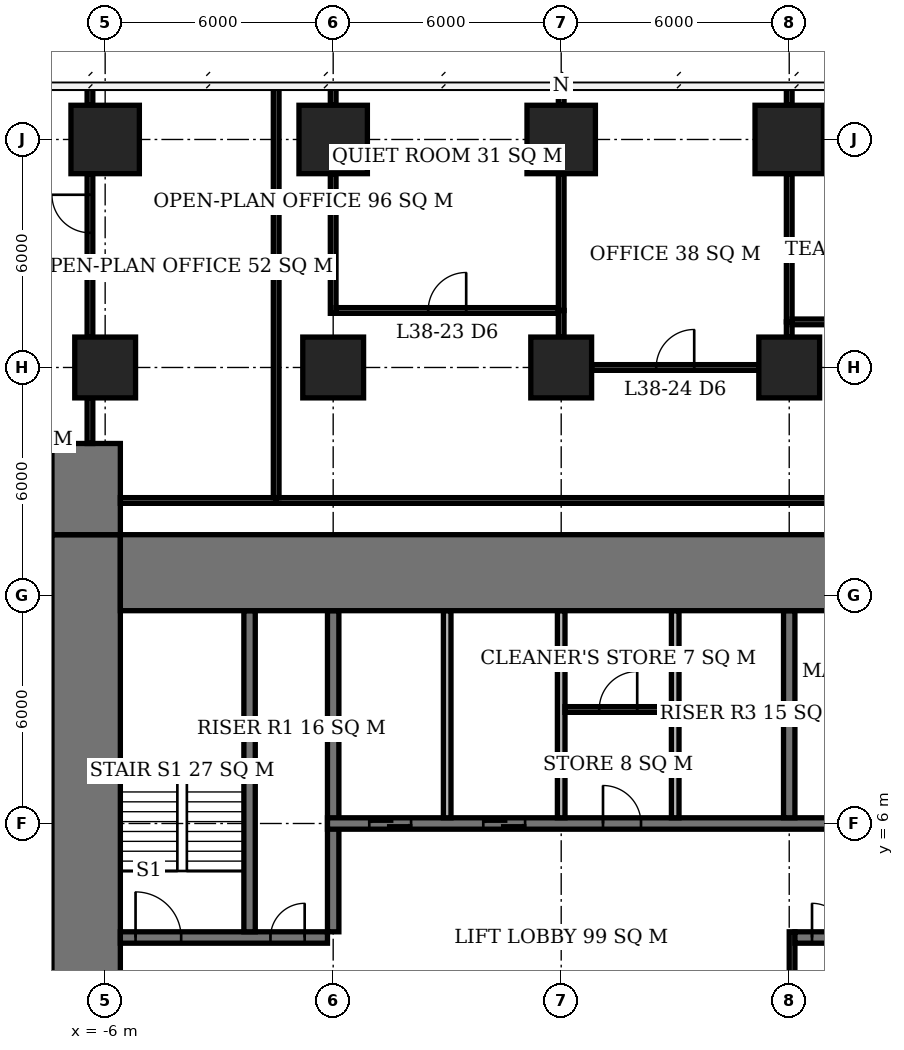
"""IFC4 building model, lengths in metres.
Left out: names, types, materials, properties, quantities, classifications, styles, units other than length and angle.
Written with IfcOpenShell. Run it as: python <this file> out.ifc"""

import sys

from ifc_helpers import new_model, si_unit, direction, frame, frame_2d, origin, origin_2d, place, context, subcontext, project, spatial, rectangle, extrude, element, fill, save


model = new_model("IFC4")
c1 = context("Model", 3, precision=1e-05, world=origin(), true_north=direction((0.0, 1.0)))
c2 = subcontext(c1, "Body", "Model", "MODEL_VIEW")
j1 = project(units=[si_unit("LENGTHUNIT", "METRE"), si_unit("PLANEANGLEUNIT", "RADIAN")], contexts=[c1])
p1 = place(None, origin())
s1 = spatial("IfcSite", under=j1, at=p1, CompositionType="ELEMENT")
p2 = place(p1, origin())
s2 = spatial("IfcBuilding", under=s1, at=p2, CompositionType="ELEMENT")
p3 = place(p2, frame((0.0, 0.0, 156.2)))
s3 = spatial("IfcBuildingStorey", under=s2, at=p3, CompositionType="ELEMENT", Elevation=156.2)
p4 = place(p3, frame((-6.0, 18.0, 0.0), z_axis=(0.0, 0.0, 1.0), x_axis=(1.0, 0.0, 0.0)))
e1 = element("IfcColumn", 1, at=p4, inside=s3, PredefinedType="COLUMN", context=c2, shape_type="SweptSolid", body=[
    extrude(rectangle(XDim=1.6, YDim=1.6, at=origin_2d()), origin(), (0.0, 0.0, 1.0), 3.9),
])
p5 = place(p3, frame((-6.0, 24.0, 0.0), z_axis=(0.0, 0.0, 1.0), x_axis=(1.0, 0.0, 0.0)))
e2 = element("IfcColumn", 2, at=p5, inside=s3, PredefinedType="COLUMN", context=c2, shape_type="SweptSolid", body=[
    extrude(rectangle(XDim=1.8, YDim=1.8, at=origin_2d()), origin(), (0.0, 0.0, 1.0), 3.9),
])
p6 = place(p3, frame((0.0, 18.0, 0.0), z_axis=(0.0, 0.0, 1.0), x_axis=(1.0, 0.0, 0.0)))
e3 = element("IfcColumn", 3, at=p6, inside=s3, PredefinedType="COLUMN", context=c2, shape_type="SweptSolid", body=[
    extrude(rectangle(XDim=1.6, YDim=1.6, at=origin_2d()), origin(), (0.0, 0.0, 1.0), 3.9),
])
p7 = place(p3, frame((0.0, 24.0, 0.0), z_axis=(0.0, 0.0, 1.0), x_axis=(1.0, 0.0, 0.0)))
e4 = element("IfcColumn", 4, at=p7, inside=s3, PredefinedType="COLUMN", context=c2, shape_type="SweptSolid", body=[
    extrude(rectangle(XDim=1.8, YDim=1.8, at=origin_2d()), origin(), (0.0, 0.0, 1.0), 3.9),
])
p8 = place(p3, frame((6.0, 18.0, 0.0), z_axis=(0.0, 0.0, 1.0), x_axis=(1.0, 0.0, 0.0)))
e5 = element("IfcColumn", 5, at=p8, inside=s3, PredefinedType="COLUMN", context=c2, shape_type="SweptSolid", body=[
    extrude(rectangle(XDim=1.6, YDim=1.6, at=origin_2d()), origin(), (0.0, 0.0, 1.0), 3.9),
])
p9 = place(p3, frame((6.0, 24.0, 0.0), z_axis=(0.0, 0.0, 1.0), x_axis=(1.0, 0.0, 0.0)))
e6 = element("IfcColumn", 6, at=p9, inside=s3, PredefinedType="COLUMN", context=c2, shape_type="SweptSolid", body=[
    extrude(rectangle(XDim=1.8, YDim=1.8, at=origin_2d()), origin(), (0.0, 0.0, 1.0), 3.9),
])
p10 = place(p3, frame((12.0, 18.0, 0.0), z_axis=(0.0, 0.0, 1.0), x_axis=(1.0, 0.0, 0.0)))
e7 = element("IfcColumn", 7, at=p10, inside=s3, PredefinedType="COLUMN", context=c2, shape_type="SweptSolid", body=[
    extrude(rectangle(XDim=1.6, YDim=1.6, at=origin_2d()), origin(), (0.0, 0.0, 1.0), 3.9),
])
p11 = place(p3, frame((12.0, 24.0, 0.0), z_axis=(0.0, 0.0, 1.0), x_axis=(1.0, 0.0, 0.0)))
e8 = element("IfcColumn", 8, at=p11, inside=s3, PredefinedType="COLUMN", context=c2, shape_type="SweptSolid", body=[
    extrude(rectangle(XDim=1.8, YDim=1.8, at=origin_2d()), origin(), (0.0, 0.0, 1.0), 3.9),
])
p12 = place(p3, frame((-5.6, 12.6, 0.0), z_axis=(0.0, 0.0, 1.0), x_axis=(1.0, 0.0, 0.0)))
e9 = element("IfcWall", 9, at=p12, inside=s3, PredefinedType="SHEAR", context=c2, shape_type="SweptSolid", body=[
    extrude(rectangle(XDim=23.2, YDim=2.0, at=frame_2d((11.6, 0.0))), origin(), (0.0, 0.0, 1.0), 3.9),
])
p13 = place(p3, frame((-6.5, -7.6, 0.0), z_axis=(0.0, 0.0, 1.0), x_axis=(0.0, 1.0, 0.0)))
e10 = element("IfcWall", 10, at=p13, inside=s3, PredefinedType="SHEAR", context=c2, shape_type="SweptSolid", body=[
    extrude(rectangle(XDim=21.2, YDim=1.8, at=frame_2d((10.6, 0.0))), origin(), (0.0, 0.0, 1.0), 3.9),
])
p14 = place(p13, frame((7.8, 0.0, 0.0)))
e11 = element("IfcOpeningElement", 11, at=p14, cuts=e10, PredefinedType="OPENING", context=c2, shape_type="SweptSolid", body=[
    extrude(rectangle(XDim=1.8, YDim=2.4, at=frame_2d((0.9, 1.2))), frame((0.0, 0.91, 0.0), z_axis=(0.0, -1.0, 0.0), x_axis=(1.0, 0.0, 0.0)), (0.0, 0.0, 1.0), 1.82),
])
p15 = place(p3, frame((-6.5, 13.6, 0.0), z_axis=(0.0, 0.0, 1.0), x_axis=(0.0, 1.0, 0.0)))
e12 = element("IfcWall", 12, at=p15, inside=s3, PredefinedType="SHEAR", context=c2, shape_type="SweptSolid", body=[
    extrude(rectangle(XDim=2.4, YDim=1.8, at=frame_2d((1.2, 0.0))), origin(), (0.0, 0.0, 1.0), 3.9),
])
p16 = place(p3, frame((-5.6, 3.0, 0.0), z_axis=(0.0, 0.0, 1.0), x_axis=(1.0, 0.0, 0.0)))
e13 = element("IfcWall", 13, at=p16, inside=s3, PredefinedType="SHEAR", context=c2, shape_type="SweptSolid", body=[
    extrude(rectangle(XDim=5.45, YDim=0.3, at=frame_2d((2.725, 0.0))), origin(), (0.0, 0.0, 1.0), 3.9),
])
p17 = place(p16, frame((0.4, 0.0, 0.0)))
e14 = element("IfcOpeningElement", 14, at=p17, cuts=e13, PredefinedType="OPENING", context=c2, shape_type="SweptSolid", body=[
    extrude(rectangle(XDim=1.2, YDim=2.1, at=frame_2d((0.6, 1.05))), frame((0.0, 0.16, 0.0), z_axis=(0.0, -1.0, 0.0), x_axis=(1.0, 0.0, 0.0)), (0.0, 0.0, 1.0), 0.32),
])
p18 = place(p16, frame((3.95, 0.0, 0.0)))
e15 = element("IfcOpeningElement", 15, at=p18, cuts=e13, PredefinedType="OPENING", context=c2, shape_type="SweptSolid", body=[
    extrude(rectangle(XDim=0.9, YDim=2.1, at=frame_2d((0.45, 1.05))), frame((0.0, 0.16, 0.0), z_axis=(0.0, -1.0, 0.0), x_axis=(1.0, 0.0, 0.0)), (0.0, 0.0, 1.0), 0.32),
])
p19 = place(p3, frame((12.15, 3.0, 0.0), z_axis=(0.0, 0.0, 1.0), x_axis=(1.0, 0.0, 0.0)))
e16 = element("IfcWall", 16, at=p19, inside=s3, PredefinedType="SHEAR", context=c2, shape_type="SweptSolid", body=[
    extrude(rectangle(XDim=5.45, YDim=0.3, at=frame_2d((2.725, 0.0))), origin(), (0.0, 0.0, 1.0), 3.9),
])
p20 = place(p19, frame((3.25, 0.0, 0.0)))
e17 = element("IfcOpeningElement", 17, at=p20, cuts=e16, PredefinedType="OPENING", context=c2, shape_type="SweptSolid", body=[
    extrude(rectangle(XDim=1.2, YDim=2.1, at=frame_2d((0.6, 1.05))), frame((0.0, 0.16, 0.0), z_axis=(0.0, -1.0, 0.0), x_axis=(1.0, 0.0, 0.0)), (0.0, 0.0, 1.0), 0.32),
])
p21 = place(p19, frame((0.45, 0.0, 0.0)))
e18 = element("IfcOpeningElement", 18, at=p21, cuts=e16, PredefinedType="OPENING", context=c2, shape_type="SweptSolid", body=[
    extrude(rectangle(XDim=0.9, YDim=2.1, at=frame_2d((0.45, 1.05))), frame((0.0, 0.16, 0.0), z_axis=(0.0, -1.0, 0.0), x_axis=(1.0, 0.0, 0.0)), (0.0, 0.0, 1.0), 0.32),
])
p22 = place(p3, frame((-0.15, 6.0, 0.0), z_axis=(0.0, 0.0, 1.0), x_axis=(1.0, 0.0, 0.0)))
e19 = element("IfcWall", 19, at=p22, inside=s3, PredefinedType="SHEAR", context=c2, shape_type="SweptSolid", body=[
    extrude(rectangle(XDim=17.75, YDim=0.3, at=frame_2d((8.875, 0.0))), origin(), (0.0, 0.0, 1.0), 3.9),
])
p23 = place(p22, frame((13.15, 0.0, 0.0)))
e20 = element("IfcOpeningElement", 20, at=p23, cuts=e19, PredefinedType="OPENING", context=c2, shape_type="SweptSolid", body=[
    extrude(rectangle(XDim=0.9, YDim=2.1, at=frame_2d((0.45, 1.05))), frame((0.0, 0.16, 0.0), z_axis=(0.0, -1.0, 0.0), x_axis=(1.0, 0.0, 0.0)), (0.0, 0.0, 1.0), 0.32),
])
p24 = place(p22, frame((7.25, 0.0, 0.0)))
e21 = element("IfcOpeningElement", 21, at=p24, cuts=e19, PredefinedType="OPENING", context=c2, shape_type="SweptSolid", body=[
    extrude(rectangle(XDim=1.0, YDim=2.1, at=frame_2d((0.5, 1.05))), frame((0.0, 0.16, 0.0), z_axis=(0.0, -1.0, 0.0), x_axis=(1.0, 0.0, 0.0)), (0.0, 0.0, 1.0), 0.32),
])
p25 = place(p22, frame((1.1, 0.0, 0.0)))
e22 = element("IfcOpeningElement", 22, at=p25, cuts=e19, PredefinedType="OPENING", context=c2, shape_type="SweptSolid", body=[
    extrude(rectangle(XDim=1.1, YDim=2.1, at=frame_2d((0.55, 1.05))), frame((0.0, 0.16, 0.0), z_axis=(0.0, -1.0, 0.0), x_axis=(1.0, 0.0, 0.0)), (0.0, 0.0, 1.0), 0.32),
])
p26 = place(p22, frame((4.1, 0.0, 0.0)))
e23 = element("IfcOpeningElement", 23, at=p26, cuts=e19, PredefinedType="OPENING", context=c2, shape_type="SweptSolid", body=[
    extrude(rectangle(XDim=1.1, YDim=2.1, at=frame_2d((0.55, 1.05))), frame((0.0, 0.16, 0.0), z_axis=(0.0, -1.0, 0.0), x_axis=(1.0, 0.0, 0.0)), (0.0, 0.0, 1.0), 0.32),
])
p27 = place(p3, frame((0.0, 3.15, 0.0), z_axis=(0.0, 0.0, 1.0), x_axis=(0.0, 1.0, 0.0)))
e24 = element("IfcWall", 24, at=p27, inside=s3, PredefinedType="SHEAR", context=c2, shape_type="SweptSolid", body=[
    extrude(rectangle(XDim=8.45, YDim=0.3, at=frame_2d((4.225, 0.0))), origin(), (0.0, 0.0, 1.0), 3.9),
])
p28 = place(p3, frame((12.0, 6.15, 0.0), z_axis=(0.0, 0.0, 1.0), x_axis=(0.0, 1.0, 0.0)))
e25 = element("IfcWall", 25, at=p28, inside=s3, PredefinedType="SHEAR", context=c2, shape_type="SweptSolid", body=[
    extrude(rectangle(XDim=5.45, YDim=0.3, at=frame_2d((2.725, 0.0))), origin(), (0.0, 0.0, 1.0), 3.9),
])
p29 = place(p3, frame((-2.2, 3.15, 0.0), z_axis=(0.0, 0.0, 1.0), x_axis=(0.0, 1.0, 0.0)))
e26 = element("IfcWall", 26, at=p29, inside=s3, PredefinedType="SHEAR", context=c2, shape_type="SweptSolid", body=[
    extrude(rectangle(XDim=8.45, YDim=0.3, at=frame_2d((4.225, 0.0))), origin(), (0.0, 0.0, 1.0), 3.9),
])
for number, where, z_axis, x_axis in (
    (27, (3.0, 6.15, 0.0), (0.0, 0.0, 1.0), (0.0, 1.0, 0.0)),
    (28, (6.0, 6.15, 0.0), (0.0, 0.0, 1.0), (0.0, 1.0, 0.0)),
    (29, (9.0, 6.15, 0.0), (0.0, 0.0, 1.0), (0.0, 1.0, 0.0)),
):
    element("IfcWall", number, at=place(p3, frame(where, z_axis=z_axis, x_axis=x_axis)), inside=s3, PredefinedType="SOLIDWALL", context=c2, shape_type="SweptSolid", body=[
        extrude(rectangle(XDim=5.45, YDim=0.2, at=frame_2d((2.725, 0.0))), origin(), (0.0, 0.0, 1.0), 3.9),
    ])
p30 = place(p3, frame((6.1, 9.0, 0.0), z_axis=(0.0, 0.0, 1.0), x_axis=(1.0, 0.0, 0.0)))
e30 = element("IfcWall", 30, at=p30, inside=s3, PredefinedType="PARTITIONING", context=c2, shape_type="SweptSolid", body=[
    extrude(rectangle(XDim=2.8, YDim=0.15, at=frame_2d((1.4, 0.0))), origin(), (0.0, 0.0, 1.0), 3.65),
])
p31 = place(p30, frame((0.9, 0.0, 0.0)))
e31 = element("IfcOpeningElement", 31, at=p31, cuts=e30, PredefinedType="OPENING", context=c2, shape_type="SweptSolid", body=[
    extrude(rectangle(XDim=1.0, YDim=2.1, at=frame_2d((0.5, 1.05))), frame((0.0, 0.085, 0.0), z_axis=(0.0, -1.0, 0.0), x_axis=(1.0, 0.0, 0.0)), (0.0, 0.0, 1.0), 0.17),
])
p32 = place(p3, frame((6.8, 18.0, 0.0), z_axis=(0.0, 0.0, 1.0), x_axis=(1.0, 0.0, 0.0)))
e32 = element("IfcWall", 32, at=p32, inside=s3, PredefinedType="PARTITIONING", context=c2, shape_type="SweptSolid", body=[
    extrude(rectangle(XDim=4.4, YDim=0.15, at=frame_2d((2.2, 0.0))), origin(), (0.0, 0.0, 1.0), 3.65),
])
p33 = place(p32, frame((1.7, 0.0, 0.0)))
e33 = element("IfcOpeningElement", 33, at=p33, cuts=e32, PredefinedType="OPENING", context=c2, shape_type="SweptSolid", body=[
    extrude(rectangle(XDim=1.0, YDim=2.1, at=frame_2d((0.5, 1.05))), frame((0.0, 0.085, 0.0), z_axis=(0.0, -1.0, 0.0), x_axis=(1.0, 0.0, 0.0)), (0.0, 0.0, 1.0), 0.17),
])
p34 = place(p3, frame((12.075, 19.2, 0.0), z_axis=(0.0, 0.0, 1.0), x_axis=(1.0, 0.0, 0.0)))
e34 = element("IfcWall", 34, at=p34, inside=s3, PredefinedType="PARTITIONING", context=c2, shape_type="SweptSolid", body=[
    extrude(rectangle(XDim=5.85, YDim=0.15, at=frame_2d((2.925, 0.0))), origin(), (0.0, 0.0, 1.0), 3.65),
])
p35 = place(p34, frame((2.425, 0.0, 0.0)))
e35 = element("IfcOpeningElement", 35, at=p35, cuts=e34, PredefinedType="OPENING", context=c2, shape_type="SweptSolid", body=[
    extrude(rectangle(XDim=1.0, YDim=2.1, at=frame_2d((0.5, 1.05))), frame((0.0, 0.085, 0.0), z_axis=(0.0, -1.0, 0.0), x_axis=(1.0, 0.0, 0.0)), (0.0, 0.0, 1.0), 0.17),
])
p36 = place(p3, frame((0.075, 19.5, 0.0), z_axis=(0.0, 0.0, 1.0), x_axis=(1.0, 0.0, 0.0)))
e36 = element("IfcWall", 36, at=p36, inside=s3, PredefinedType="PARTITIONING", context=c2, shape_type="SweptSolid", body=[
    extrude(rectangle(XDim=5.85, YDim=0.15, at=frame_2d((2.925, 0.0))), origin(), (0.0, 0.0, 1.0), 3.65),
])
p37 = place(p36, frame((2.425, 0.0, 0.0)))
e37 = element("IfcOpeningElement", 37, at=p37, cuts=e36, PredefinedType="OPENING", context=c2, shape_type="SweptSolid", body=[
    extrude(rectangle(XDim=1.0, YDim=2.1, at=frame_2d((0.5, 1.05))), frame((0.0, 0.085, 0.0), z_axis=(0.0, -1.0, 0.0), x_axis=(1.0, 0.0, 0.0)), (0.0, 0.0, 1.0), 0.17),
])
p38 = place(p3, frame((0.0, 19.425, 0.0), z_axis=(0.0, 0.0, 1.0), x_axis=(0.0, 1.0, 0.0)))
e38 = element("IfcWall", 38, at=p38, inside=s3, PredefinedType="PARTITIONING", context=c2, shape_type="SweptSolid", body=[
    extrude(rectangle(XDim=3.675, YDim=0.15, at=frame_2d((1.837, 0.0))), origin(), (0.0, 0.0, 1.0), 3.65),
])
p39 = place(p3, frame((0.0, 24.9, 0.0), z_axis=(0.0, 0.0, 1.0), x_axis=(0.0, 1.0, 0.0)))
e39 = element("IfcWall", 39, at=p39, inside=s3, PredefinedType="PARTITIONING", context=c2, shape_type="SweptSolid", body=[
    extrude(rectangle(XDim=0.5, YDim=0.15, at=frame_2d((0.25, 0.0))), origin(), (0.0, 0.0, 1.0), 3.65),
])
p40 = place(p3, frame((6.0, 18.8, 0.0), z_axis=(0.0, 0.0, 1.0), x_axis=(0.0, 1.0, 0.0)))
e40 = element("IfcWall", 40, at=p40, inside=s3, PredefinedType="PARTITIONING", context=c2, shape_type="SweptSolid", body=[
    extrude(rectangle(XDim=0.7, YDim=0.15, at=frame_2d((0.35, 0.0))), origin(), (0.0, 0.0, 1.0), 3.65),
])
p41 = place(p3, frame((6.0, 19.5, 0.0), z_axis=(0.0, 0.0, 1.0), x_axis=(0.0, 1.0, 0.0)))
e41 = element("IfcWall", 41, at=p41, inside=s3, PredefinedType="PARTITIONING", context=c2, shape_type="SweptSolid", body=[
    extrude(rectangle(XDim=3.6, YDim=0.15, at=frame_2d((1.8, 0.0))), origin(), (0.0, 0.0, 1.0), 3.65),
])
p42 = place(p3, frame((6.0, 24.9, 0.0), z_axis=(0.0, 0.0, 1.0), x_axis=(0.0, 1.0, 0.0)))
e42 = element("IfcWall", 42, at=p42, inside=s3, PredefinedType="PARTITIONING", context=c2, shape_type="SweptSolid", body=[
    extrude(rectangle(XDim=0.45, YDim=0.15, at=frame_2d((0.225, 0.0))), origin(), (0.0, 0.0, 1.0), 3.65),
])
p43 = place(p3, frame((12.0, 18.8, 0.0), z_axis=(0.0, 0.0, 1.0), x_axis=(0.0, 1.0, 0.0)))
e43 = element("IfcWall", 43, at=p43, inside=s3, PredefinedType="PARTITIONING", context=c2, shape_type="SweptSolid", body=[
    extrude(rectangle(XDim=0.4, YDim=0.15, at=frame_2d((0.2, 0.0))), origin(), (0.0, 0.0, 1.0), 3.65),
])
p44 = place(p3, frame((12.0, 19.2, 0.0), z_axis=(0.0, 0.0, 1.0), x_axis=(0.0, 1.0, 0.0)))
e44 = element("IfcWall", 44, at=p44, inside=s3, PredefinedType="PARTITIONING", context=c2, shape_type="SweptSolid", body=[
    extrude(rectangle(XDim=3.9, YDim=0.15, at=frame_2d((1.95, 0.0))), origin(), (0.0, 0.0, 1.0), 3.65),
])
p45 = place(p3, frame((12.0, 24.9, 0.0), z_axis=(0.0, 0.0, 1.0), x_axis=(0.0, 1.0, 0.0)))
e45 = element("IfcWall", 45, at=p45, inside=s3, PredefinedType="PARTITIONING", context=c2, shape_type="SweptSolid", body=[
    extrude(rectangle(XDim=0.5, YDim=0.15, at=frame_2d((0.25, 0.0))), origin(), (0.0, 0.0, 1.0), 3.65),
])
p46 = place(p3, frame((-6.4, 16.0, 0.0), z_axis=(0.0, 0.0, 1.0), x_axis=(0.0, 1.0, 0.0)))
e46 = element("IfcWall", 46, at=p46, inside=s3, PredefinedType="PARTITIONING", context=c2, shape_type="SweptSolid", body=[
    extrude(rectangle(XDim=1.2, YDim=0.15, at=frame_2d((0.6, 0.0))), origin(), (0.0, 0.0, 1.0), 3.65),
])
p47 = place(p3, frame((-6.4, 18.8, 0.0), z_axis=(0.0, 0.0, 1.0), x_axis=(0.0, 1.0, 0.0)))
e47 = element("IfcWall", 47, at=p47, inside=s3, PredefinedType="PARTITIONING", context=c2, shape_type="SweptSolid", body=[
    extrude(rectangle(XDim=4.3, YDim=0.15, at=frame_2d((2.15, 0.0))), origin(), (0.0, 0.0, 1.0), 3.65),
])
p48 = place(p47, frame((2.745, 0.0, 0.0)))
e48 = element("IfcOpeningElement", 48, at=p48, cuts=e47, PredefinedType="OPENING", context=c2, shape_type="SweptSolid", body=[
    extrude(rectangle(XDim=1.0, YDim=2.1, at=frame_2d((0.5, 1.05))), frame((0.0, 0.085, 0.0), z_axis=(0.0, -1.0, 0.0), x_axis=(1.0, 0.0, 0.0)), (0.0, 0.0, 1.0), 0.17),
])
p49 = place(p3, frame((-6.4, 24.9, 0.0), z_axis=(0.0, 0.0, 1.0), x_axis=(0.0, 1.0, 0.0)))
e49 = element("IfcWall", 49, at=p49, inside=s3, PredefinedType="PARTITIONING", context=c2, shape_type="SweptSolid", body=[
    extrude(rectangle(XDim=0.45, YDim=0.15, at=frame_2d((0.225, 0.0))), origin(), (0.0, 0.0, 1.0), 3.65),
])
p50 = place(p3, frame((-5.6, 14.5, 0.0), z_axis=(0.0, 0.0, 1.0), x_axis=(1.0, 0.0, 0.0)))
e50 = element("IfcWall", 50, at=p50, inside=s3, PredefinedType="PARTITIONING", context=c2, shape_type="SweptSolid", body=[
    extrude(rectangle(XDim=4.1, YDim=0.15, at=frame_2d((2.05, 0.0))), origin(), (0.0, 0.0, 1.0), 3.65),
])
p51 = place(p3, frame((-1.5, 14.575, 0.0), z_axis=(0.0, 0.0, 1.0), x_axis=(0.0, 1.0, 0.0)))
e51 = element("IfcWall", 51, at=p51, inside=s3, PredefinedType="PARTITIONING", context=c2, shape_type="SweptSolid", body=[
    extrude(rectangle(XDim=10.825, YDim=0.15, at=frame_2d((5.413, 0.0))), origin(), (0.0, 0.0, 1.0), 3.65),
])
p52 = place(p3, frame((-1.5, 14.5, 0.0), z_axis=(0.0, 0.0, 1.0), x_axis=(1.0, 0.0, 0.0)))
e52 = element("IfcWall", 52, at=p52, inside=s3, PredefinedType="PARTITIONING", context=c2, shape_type="SweptSolid", body=[
    extrude(rectangle(XDim=19.1, YDim=0.15, at=frame_2d((9.55, 0.0))), origin(), (0.0, 0.0, 1.0), 3.65),
])
p53 = place(p3, frame((12.075, 0.15, 0.0), z_axis=(0.0, 0.0, 1.0), x_axis=(0.0, 1.0, 0.0)))
e53 = element("IfcWall", 53, at=p53, inside=s3, PredefinedType="PARTITIONING", context=c2, shape_type="SweptSolid", body=[
    extrude(rectangle(XDim=3.0, YDim=0.15, at=frame_2d((1.5, 0.0))), origin(), (0.0, 0.0, 1.0), 3.65),
])
p54 = place(p17, origin())
e54 = element("IfcDoor", 54, at=p54, inside=s3, OperationType="SINGLE_SWING_LEFT", PredefinedType="DOOR", context=c2, shape_type="SweptSolid", body=[
    extrude(rectangle(XDim=1.2, YDim=2.1, at=frame_2d((0.6, 1.05))), frame((0.0, 0.025, 0.0), z_axis=(0.0, -1.0, 0.0), x_axis=(1.0, 0.0, 0.0)), (0.0, 0.0, 1.0), 0.05),
])
fill(e14, e54)
p55 = place(p18, origin())
e55 = element("IfcDoor", 55, at=p55, inside=s3, OperationType="SINGLE_SWING_RIGHT", PredefinedType="DOOR", context=c2, shape_type="SweptSolid", body=[
    extrude(rectangle(XDim=0.9, YDim=2.1, at=frame_2d((0.45, 1.05))), frame((0.0, 0.025, 0.0), z_axis=(0.0, -1.0, 0.0), x_axis=(1.0, 0.0, 0.0)), (0.0, 0.0, 1.0), 0.05),
])
fill(e15, e55)
p56 = place(p21, origin())
e56 = element("IfcDoor", 56, at=p56, inside=s3, OperationType="SINGLE_SWING_LEFT", PredefinedType="DOOR", context=c2, shape_type="SweptSolid", body=[
    extrude(rectangle(XDim=0.9, YDim=2.1, at=frame_2d((0.45, 1.05))), frame((0.0, 0.025, 0.0), z_axis=(0.0, -1.0, 0.0), x_axis=(1.0, 0.0, 0.0)), (0.0, 0.0, 1.0), 0.05),
])
fill(e18, e56)
p57 = place(p31, origin())
e57 = element("IfcDoor", 57, at=p57, inside=s3, OperationType="SINGLE_SWING_RIGHT", PredefinedType="DOOR", context=c2, shape_type="SweptSolid", body=[
    extrude(rectangle(XDim=1.0, YDim=2.1, at=frame_2d((0.5, 1.05))), frame((0.0, 0.025, 0.0), z_axis=(0.0, -1.0, 0.0), x_axis=(1.0, 0.0, 0.0)), (0.0, 0.0, 1.0), 0.05),
])
fill(e31, e57)
p58 = place(p24, origin())
e58 = element("IfcDoor", 58, at=p58, inside=s3, OperationType="SINGLE_SWING_LEFT", PredefinedType="DOOR", context=c2, shape_type="SweptSolid", body=[
    extrude(rectangle(XDim=1.0, YDim=2.1, at=frame_2d((0.5, 1.05))), frame((0.0, 0.025, 0.0), z_axis=(0.0, -1.0, 0.0), x_axis=(1.0, 0.0, 0.0)), (0.0, 0.0, 1.0), 0.05),
])
fill(e21, e58)
p59 = place(p25, origin())
e59 = element("IfcDoor", 59, at=p59, inside=s3, OperationType="DOUBLE_DOOR_SLIDING", PredefinedType="USERDEFINED", context=c2, shape_type="SweptSolid", body=[
    extrude(rectangle(XDim=1.1, YDim=2.1, at=frame_2d((0.55, 1.05))), frame((0.0, 0.025, 0.0), z_axis=(0.0, -1.0, 0.0), x_axis=(1.0, 0.0, 0.0)), (0.0, 0.0, 1.0), 0.05),
])
fill(e22, e59)
p60 = place(p26, origin())
e60 = element("IfcDoor", 60, at=p60, inside=s3, OperationType="DOUBLE_DOOR_SLIDING", PredefinedType="USERDEFINED", context=c2, shape_type="SweptSolid", body=[
    extrude(rectangle(XDim=1.1, YDim=2.1, at=frame_2d((0.55, 1.05))), frame((0.0, 0.025, 0.0), z_axis=(0.0, -1.0, 0.0), x_axis=(1.0, 0.0, 0.0)), (0.0, 0.0, 1.0), 0.05),
])
fill(e23, e60)
p61 = place(p37, origin())
e61 = element("IfcDoor", 61, at=p61, inside=s3, OperationType="SINGLE_SWING_RIGHT", PredefinedType="DOOR", context=c2, shape_type="SweptSolid", body=[
    extrude(rectangle(XDim=1.0, YDim=2.1, at=frame_2d((0.5, 1.05))), frame((0.0, 0.025, 0.0), z_axis=(0.0, -1.0, 0.0), x_axis=(1.0, 0.0, 0.0)), (0.0, 0.0, 1.0), 0.05),
])
fill(e37, e61)
p62 = place(p33, origin())
e62 = element("IfcDoor", 62, at=p62, inside=s3, OperationType="SINGLE_SWING_RIGHT", PredefinedType="DOOR", context=c2, shape_type="SweptSolid", body=[
    extrude(rectangle(XDim=1.0, YDim=2.1, at=frame_2d((0.5, 1.05))), frame((0.0, 0.025, 0.0), z_axis=(0.0, -1.0, 0.0), x_axis=(1.0, 0.0, 0.0)), (0.0, 0.0, 1.0), 0.05),
])
fill(e33, e62)
p63 = place(p48, origin())
e63 = element("IfcDoor", 63, at=p63, inside=s3, OperationType="SINGLE_SWING_RIGHT", PredefinedType="DOOR", context=c2, shape_type="SweptSolid", body=[
    extrude(rectangle(XDim=1.0, YDim=2.1, at=frame_2d((0.5, 1.05))), frame((0.0, 0.025, 0.0), z_axis=(0.0, -1.0, 0.0), x_axis=(1.0, 0.0, 0.0)), (0.0, 0.0, 1.0), 0.05),
])
fill(e48, e63)
save(model, sys.argv[1])
